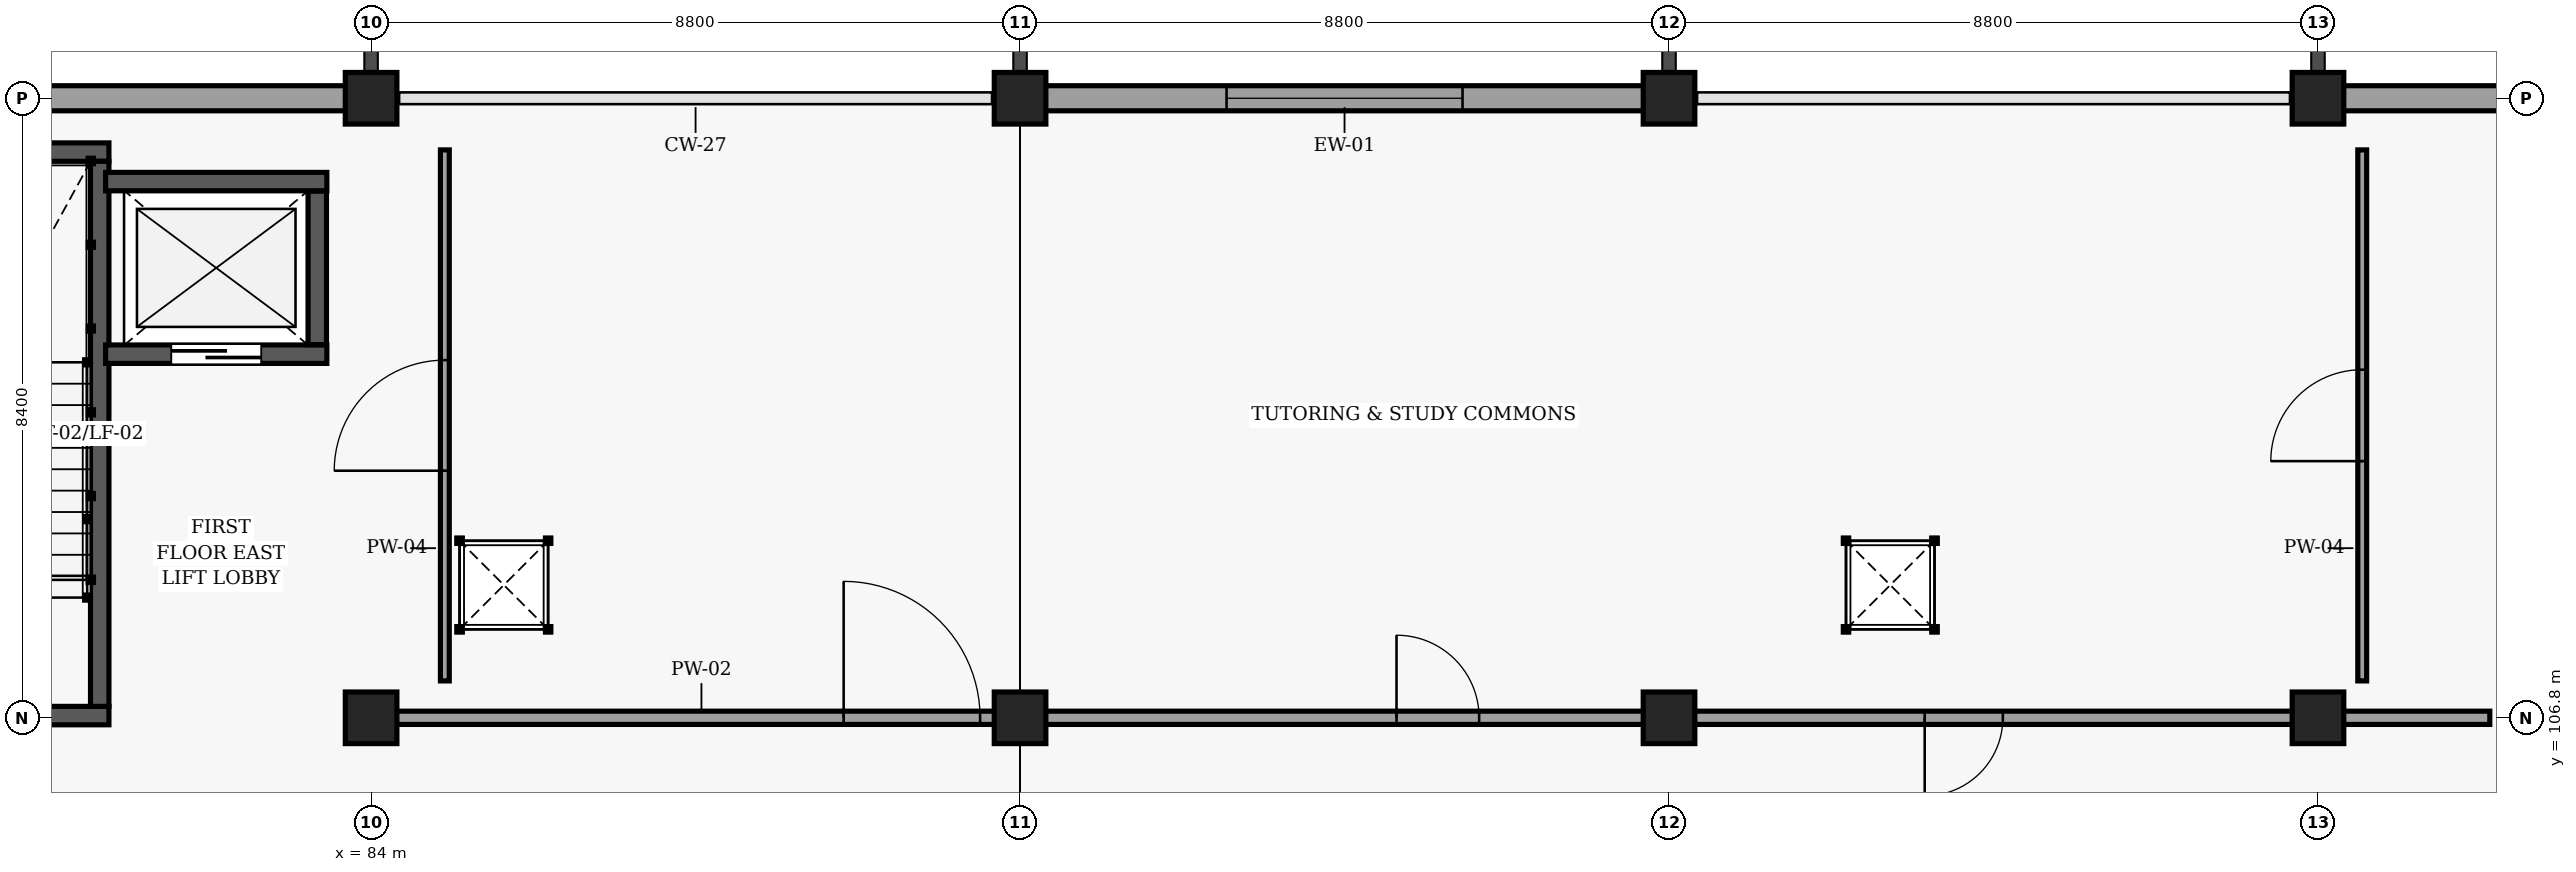
"""IFC4 building model, lengths in metres.
Left out: names, types, materials, properties, quantities, classifications, styles, units other than length and angle.
Written with IfcOpenShell. Run it as: python <this file> out.ifc"""

import sys

from ifc_helpers import new_model, si_unit, direction, frame, frame_2d, origin, origin_2d, place, context, subcontext, project, spatial, rectangle, extrude, element, fill, save


model = new_model("IFC4")
c1 = context("Model", 3, precision=1e-05, world=origin(), true_north=direction((0.0, 1.0)))
c2 = subcontext(c1, "Body", "Model", "MODEL_VIEW")
j1 = project(units=[si_unit("LENGTHUNIT", "METRE"), si_unit("PLANEANGLEUNIT", "RADIAN")], contexts=[c1])
p1 = place(None, origin())
s1 = spatial("IfcSite", under=j1, at=p1, CompositionType="ELEMENT")
p2 = place(p1, origin())
s2 = spatial("IfcBuilding", under=s1, at=p2, CompositionType="ELEMENT")
p3 = place(p2, frame((0.0, 0.0, 4.8)))
s3 = spatial("IfcBuildingStorey", under=s2, at=p3, CompositionType="ELEMENT", Elevation=4.8)
for number, where, z_axis, x_axis in (
    (1, (84.0, 106.8, 0.0), (0.0, 0.0, 1.0), (1.0, 0.0, 0.0)),
    (2, (84.0, 115.2, 0.0), (0.0, 0.0, 1.0), (1.0, 0.0, 0.0)),
    (3, (92.8, 106.8, 0.0), (0.0, 0.0, 1.0), (1.0, 0.0, 0.0)),
    (4, (92.8, 115.2, 0.0), (0.0, 0.0, 1.0), (1.0, 0.0, 0.0)),
    (5, (101.6, 106.8, 0.0), (0.0, 0.0, 1.0), (1.0, 0.0, 0.0)),
    (6, (101.6, 115.2, 0.0), (0.0, 0.0, 1.0), (1.0, 0.0, 0.0)),
    (7, (110.4, 106.8, 0.0), (0.0, 0.0, 1.0), (1.0, 0.0, 0.0)),
    (8, (110.4, 115.2, 0.0), (0.0, 0.0, 1.0), (1.0, 0.0, 0.0)),
):
    element("IfcColumn", number, at=place(p3, frame(where, z_axis=z_axis, x_axis=x_axis)), inside=s3, PredefinedType="COLUMN", context=c2, shape_type="SweptSolid", body=[
        extrude(rectangle(XDim=0.7, YDim=0.7, at=origin_2d()), origin(), (0.0, 0.0, 1.0), 4.2),
    ])
p4 = place(p3, frame((75.3, 115.2, 0.0), z_axis=(0.0, 0.0, 1.0), x_axis=(1.0, 0.0, 0.0)))
e9 = element("IfcWall", 9, at=p4, inside=s3, PredefinedType="SOLIDWALL", context=c2, shape_type="SweptSolid", body=[
    extrude(rectangle(XDim=8.6, YDim=0.34, at=frame_2d((4.3, 0.0))), origin(), (0.0, 0.0, 1.0), 3.145),
])
p5 = place(p3, frame((92.9, 115.2, 0.0), z_axis=(0.0, 0.0, 1.0), x_axis=(1.0, 0.0, 0.0)))
e10 = element("IfcWall", 10, at=p5, inside=s3, PredefinedType="SOLIDWALL", context=c2, shape_type="SweptSolid", body=[
    extrude(rectangle(XDim=8.6, YDim=0.34, at=frame_2d((4.3, 0.0))), origin(), (0.0, 0.0, 1.0), 3.145),
])
p6 = place(p5, frame((2.7, 0.0, 0.825)))
e11 = element("IfcOpeningElement", 11, at=p6, cuts=e10, PredefinedType="OPENING", context=c2, shape_type="SweptSolid", body=[
    extrude(rectangle(XDim=3.2, YDim=2.1, at=frame_2d((1.6, 1.05))), frame((0.0, 0.18, 0.0), z_axis=(0.0, -1.0, 0.0), x_axis=(1.0, 0.0, 0.0)), (0.0, 0.0, 1.0), 0.36),
])
p7 = place(p3, frame((110.5, 115.2, 0.0), z_axis=(0.0, 0.0, 1.0), x_axis=(1.0, 0.0, 0.0)))
e12 = element("IfcWall", 12, at=p7, inside=s3, PredefinedType="SOLIDWALL", context=c2, shape_type="SweptSolid", body=[
    extrude(rectangle(XDim=8.6, YDim=0.34, at=frame_2d((4.3, 0.0))), origin(), (0.0, 0.0, 1.0), 3.145),
])
p8 = place(p3, frame((80.445, 106.83, 0.0), z_axis=(0.0, 0.0, 1.0), x_axis=(-1.0, 0.0, 0.0)))
e13 = element("IfcWall", 13, at=p8, inside=s3, PredefinedType="SHEAR", context=c2, shape_type="SweptSolid", body=[
    extrude(rectangle(XDim=3.61, YDim=0.25, at=frame_2d((1.805, 0.0))), origin(), (0.0, 0.0, 1.0), 3.96),
])
p9 = place(p8, frame((1.235, 0.0, 0.0)))
e14 = element("IfcOpeningElement", 14, at=p9, cuts=e13, PredefinedType="OPENING", context=c2, shape_type="SweptSolid", body=[
    extrude(rectangle(XDim=1.14, YDim=2.15, at=frame_2d((0.57, 1.075))), frame((0.0, 0.135, 0.0), z_axis=(0.0, -1.0, 0.0), x_axis=(1.0, 0.0, 0.0)), (0.0, 0.0, 1.0), 0.27),
])
p10 = place(p3, frame((76.835, 114.47, 0.0), z_axis=(0.0, 0.0, 1.0), x_axis=(1.0, 0.0, 0.0)))
e15 = element("IfcWall", 15, at=p10, inside=s3, PredefinedType="SHEAR", context=c2, shape_type="SweptSolid", body=[
    extrude(rectangle(XDim=3.61, YDim=0.25, at=frame_2d((1.805, 0.0))), origin(), (0.0, 0.0, 1.0), 3.96),
])
p11 = place(p3, frame((80.32, 114.345, 0.0), z_axis=(0.0, 0.0, 1.0), x_axis=(0.0, -1.0, 0.0)))
e16 = element("IfcWall", 16, at=p11, inside=s3, PredefinedType="SHEAR", context=c2, shape_type="SweptSolid", body=[
    extrude(rectangle(XDim=7.39, YDim=0.25, at=frame_2d((3.695, 0.0))), origin(), (0.0, 0.0, 1.0), 3.96),
])
p12 = place(p3, frame((80.4, 111.73, 0.0), z_axis=(0.0, 0.0, 1.0), x_axis=(1.0, 0.0, 0.0)))
e17 = element("IfcWall", 17, at=p12, inside=s3, PredefinedType="SHEAR", context=c2, shape_type="SweptSolid", body=[
    extrude(rectangle(XDim=3.0, YDim=0.25, at=frame_2d((1.5, 0.0))), origin(), (0.0, 0.0, 1.0), 3.96),
])
p13 = place(p12, frame((0.89, 0.0, 0.0)))
e18 = element("IfcOpeningElement", 18, at=p13, cuts=e17, PredefinedType="OPENING", context=c2, shape_type="SweptSolid", body=[
    extrude(rectangle(XDim=1.22, YDim=2.18, at=frame_2d((0.61, 1.09))), frame((0.0, 0.135, 0.0), z_axis=(0.0, -1.0, 0.0), x_axis=(1.0, 0.0, 0.0)), (0.0, 0.0, 1.0), 0.27),
])
p14 = place(p3, frame((83.4, 114.07, 0.0), z_axis=(0.0, 0.0, 1.0), x_axis=(-1.0, 0.0, 0.0)))
e19 = element("IfcWall", 19, at=p14, inside=s3, PredefinedType="SHEAR", context=c2, shape_type="SweptSolid", body=[
    extrude(rectangle(XDim=3.0, YDim=0.25, at=frame_2d((1.5, 0.0))), origin(), (0.0, 0.0, 1.0), 3.96),
])
p15 = place(p3, frame((83.27, 111.86, 0.0), z_axis=(0.0, 0.0, 1.0), x_axis=(0.0, 1.0, 0.0)))
e20 = element("IfcWall", 20, at=p15, inside=s3, PredefinedType="SHEAR", context=c2, shape_type="SweptSolid", body=[
    extrude(rectangle(XDim=2.08, YDim=0.25, at=frame_2d((1.04, 0.0))), origin(), (0.0, 0.0, 1.0), 3.96),
])
p16 = place(p3, frame((84.2, 106.8, 0.0), z_axis=(0.0, 0.0, 1.0), x_axis=(1.0, 0.0, 0.0)))
e21 = element("IfcWall", 21, at=p16, inside=s3, PredefinedType="PARTITIONING", context=c2, shape_type="SweptSolid", body=[
    extrude(rectangle(XDim=28.53, YDim=0.18, at=frame_2d((14.265, 0.0))), origin(), (0.0, 0.0, 1.0), 3.145),
])
p17 = place(p16, frame((6.208, 0.0, 0.0)))
e22 = element("IfcOpeningElement", 22, at=p17, cuts=e21, PredefinedType="OPENING", context=c2, shape_type="SweptSolid", body=[
    extrude(rectangle(XDim=1.85, YDim=2.22, at=frame_2d((0.925, 1.11))), frame((0.0, 0.1, 0.0), z_axis=(0.0, -1.0, 0.0), x_axis=(1.0, 0.0, 0.0)), (0.0, 0.0, 1.0), 0.2),
])
p18 = place(p16, frame((13.705, 0.0, 0.0)))
e23 = element("IfcOpeningElement", 23, at=p18, cuts=e21, PredefinedType="OPENING", context=c2, shape_type="SweptSolid", body=[
    extrude(rectangle(XDim=1.12, YDim=2.16, at=frame_2d((0.56, 1.08))), frame((0.0, 0.1, 0.0), z_axis=(0.0, -1.0, 0.0), x_axis=(1.0, 0.0, 0.0)), (0.0, 0.0, 1.0), 0.2),
])
p19 = place(p16, frame((20.867, 0.0, 0.0)))
e24 = element("IfcOpeningElement", 24, at=p19, cuts=e21, PredefinedType="OPENING", context=c2, shape_type="SweptSolid", body=[
    extrude(rectangle(XDim=1.06, YDim=2.16, at=frame_2d((0.53, 1.08))), frame((0.0, 0.1, 0.0), z_axis=(0.0, -1.0, 0.0), x_axis=(1.0, 0.0, 0.0)), (0.0, 0.0, 1.0), 0.2),
])
p20 = place(p3, frame((85.0, 107.3, 0.0), z_axis=(0.0, 0.0, 1.0), x_axis=(0.0, 1.0, 0.0)))
e25 = element("IfcWall", 25, at=p20, inside=s3, PredefinedType="PARTITIONING", context=c2, shape_type="SweptSolid", body=[
    extrude(rectangle(XDim=7.2, YDim=0.12, at=frame_2d((3.6, 0.0))), origin(), (0.0, 0.0, 1.0), 3.945),
])
p21 = place(p20, frame((2.85, 0.0, 0.0)))
e26 = element("IfcOpeningElement", 26, at=p21, cuts=e25, PredefinedType="OPENING", context=c2, shape_type="SweptSolid", body=[
    extrude(rectangle(XDim=1.5, YDim=2.25, at=frame_2d((0.75, 1.125))), frame((0.0, 0.07, 0.0), z_axis=(0.0, -1.0, 0.0), x_axis=(1.0, 0.0, 0.0)), (0.0, 0.0, 1.0), 0.14),
])
p22 = place(p3, frame((111.0, 107.3, 0.0), z_axis=(0.0, 0.0, 1.0), x_axis=(0.0, 1.0, 0.0)))
e27 = element("IfcWall", 27, at=p22, inside=s3, PredefinedType="PARTITIONING", context=c2, shape_type="SweptSolid", body=[
    extrude(rectangle(XDim=7.2, YDim=0.12, at=frame_2d((3.6, 0.0))), origin(), (0.0, 0.0, 1.0), 3.945),
])
p23 = place(p22, frame((2.98, 0.0, 0.0)))
e28 = element("IfcOpeningElement", 28, at=p23, cuts=e27, PredefinedType="OPENING", context=c2, shape_type="SweptSolid", body=[
    extrude(rectangle(XDim=1.24, YDim=2.2, at=frame_2d((0.62, 1.1))), frame((0.0, 0.07, 0.0), z_axis=(0.0, -1.0, 0.0), x_axis=(1.0, 0.0, 0.0)), (0.0, 0.0, 1.0), 0.14),
])
p24 = place(p6, origin())
e29 = element("IfcWindow", 29, at=p24, inside=s3, PartitioningType="SINGLE_PANEL", PredefinedType="WINDOW", context=c2, shape_type="SweptSolid", body=[
    extrude(rectangle(XDim=3.2, YDim=2.1, at=frame_2d((1.6, 1.05))), frame((0.0, 0.03, 0.0), z_axis=(0.0, -1.0, 0.0), x_axis=(1.0, 0.0, 0.0)), (0.0, 0.0, 1.0), 0.06),
])
fill(e11, e29)
p25 = place(p13, origin())
e30 = element("IfcDoor", 30, at=p25, inside=s3, OperationType="SLIDING_TO_RIGHT", PredefinedType="DOOR", context=c2, shape_type="SweptSolid", body=[
    extrude(rectangle(XDim=1.22, YDim=2.18, at=frame_2d((0.61, 1.09))), frame((0.0, 0.025, 0.0), z_axis=(0.0, -1.0, 0.0), x_axis=(1.0, 0.0, 0.0)), (0.0, 0.0, 1.0), 0.05),
])
fill(e18, e30)
p26 = place(p17, origin())
e31 = element("IfcDoor", 31, at=p26, inside=s3, OperationType="DOUBLE_DOOR_SINGLE_SWING", PredefinedType="DOOR", context=c2, shape_type="SweptSolid", body=[
    extrude(rectangle(XDim=1.85, YDim=2.22, at=frame_2d((0.925, 1.11))), frame((0.0, 0.025, 0.0), z_axis=(0.0, -1.0, 0.0), x_axis=(1.0, 0.0, 0.0)), (0.0, 0.0, 1.0), 0.05),
])
fill(e22, e31)
p27 = place(p18, origin())
e32 = element("IfcDoor", 32, at=p27, inside=s3, OperationType="SINGLE_SWING_LEFT", PredefinedType="DOOR", context=c2, shape_type="SweptSolid", body=[
    extrude(rectangle(XDim=1.12, YDim=2.16, at=frame_2d((0.56, 1.08))), frame((0.0, 0.025, 0.0), z_axis=(0.0, -1.0, 0.0), x_axis=(1.0, 0.0, 0.0)), (0.0, 0.0, 1.0), 0.05),
])
fill(e23, e32)
p28 = place(p19, origin())
e33 = element("IfcDoor", 33, at=p28, inside=s3, OperationType="SINGLE_SWING_RIGHT", PredefinedType="DOOR", context=c2, shape_type="SweptSolid", body=[
    extrude(rectangle(XDim=1.06, YDim=2.16, at=frame_2d((0.53, 1.08))), frame((0.0, 0.025, 0.0), z_axis=(0.0, -1.0, 0.0), x_axis=(1.0, 0.0, 0.0)), (0.0, 0.0, 1.0), 0.05),
])
fill(e24, e33)
p29 = place(p21, origin())
e34 = element("IfcDoor", 34, at=p29, inside=s3, OperationType="DOUBLE_DOOR_SINGLE_SWING", PredefinedType="DOOR", context=c2, shape_type="SweptSolid", body=[
    extrude(rectangle(XDim=1.5, YDim=2.25, at=frame_2d((0.75, 1.125))), frame((0.0, 0.025, 0.0), z_axis=(0.0, -1.0, 0.0), x_axis=(1.0, 0.0, 0.0)), (0.0, 0.0, 1.0), 0.05),
])
fill(e26, e34)
p30 = place(p23, origin())
e35 = element("IfcDoor", 35, at=p30, inside=s3, OperationType="SINGLE_SWING_LEFT", PredefinedType="DOOR", context=c2, shape_type="SweptSolid", body=[
    extrude(rectangle(XDim=1.24, YDim=2.2, at=frame_2d((0.62, 1.1))), frame((0.0, 0.025, 0.0), z_axis=(0.0, -1.0, 0.0), x_axis=(1.0, 0.0, 0.0)), (0.0, 0.0, 1.0), 0.05),
])
fill(e28, e35)
save(model, sys.argv[1])
